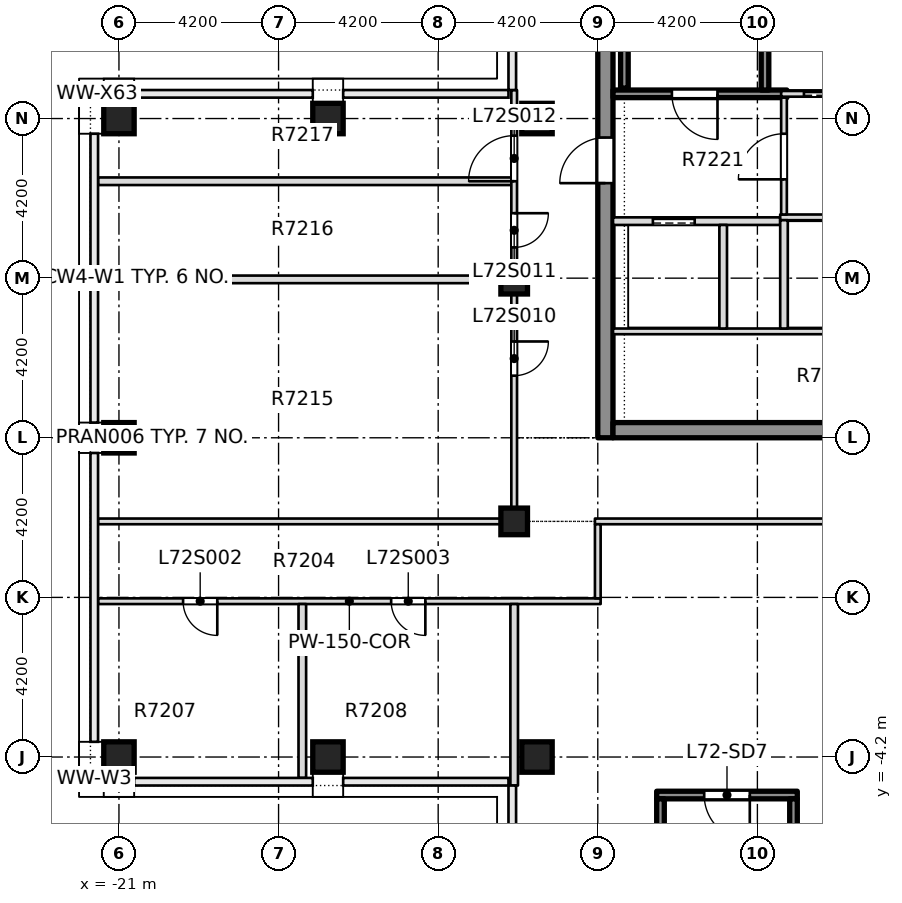
"""IFC4 building model, lengths in metres.
Left out: names, types, materials, properties, quantities, classifications, styles, units other than length and angle.
Written with IfcOpenShell. Run it as: python <this file> out.ifc"""

import sys

from ifc_helpers import new_model, si_unit, direction, frame, frame_2d, origin, origin_2d, place, context, subcontext, project, spatial, rectangle, extrude, element, fill, save


model = new_model("IFC4")
c1 = context("Model", 3, precision=1e-05, world=origin(), true_north=direction((0.0, 1.0)))
c2 = subcontext(c1, "Body", "Model", "MODEL_VIEW")
j1 = project(units=[si_unit("LENGTHUNIT", "METRE"), si_unit("PLANEANGLEUNIT", "RADIAN")], contexts=[c1])
p1 = place(None, origin())
s1 = spatial("IfcSite", under=j1, at=p1, CompositionType="ELEMENT")
p2 = place(p1, origin())
s2 = spatial("IfcBuilding", under=s1, at=p2, CompositionType="ELEMENT")
p3 = place(p2, frame((0.0, 0.0, 273.85)))
s3 = spatial("IfcBuildingStorey", under=s2, at=p3, CompositionType="ELEMENT", Elevation=273.85)
p4 = place(p3, frame((-8.2, 4.2, -0.5), z_axis=(0.0, 0.0, 1.0), x_axis=(0.0, 1.0, 0.0)))
e1 = element("IfcWall", 1, at=p4, inside=s3, PredefinedType="SHEAR", context=c2, shape_type="SweptSolid", body=[
    extrude(rectangle(XDim=17.55, YDim=0.4, at=frame_2d((8.775, 0.0))), origin(), (0.0, 0.0, 1.0), 4.5),
])
p5 = place(p4, frame((6.7, 0.0, 0.5)))
e2 = element("IfcOpeningElement", 2, at=p5, cuts=e1, PredefinedType="OPENING", context=c2, shape_type="SweptSolid", body=[
    extrude(rectangle(XDim=1.2, YDim=2.1, at=frame_2d((0.6, 1.05))), frame((0.0, 0.21, 0.0), z_axis=(0.0, -1.0, 0.0), x_axis=(1.0, 0.0, 0.0)), (0.0, 0.0, 1.0), 0.42),
])
p6 = place(p3, frame((-8.0, 4.4, -0.5), z_axis=(0.0, 0.0, 1.0), x_axis=(1.0, 0.0, 0.0)))
e3 = element("IfcWall", 3, at=p6, inside=s3, PredefinedType="SHEAR", context=c2, shape_type="SweptSolid", body=[
    extrude(rectangle(XDim=16.0, YDim=0.4, at=frame_2d((8.0, 0.0))), origin(), (0.0, 0.0, 1.0), 4.5),
])
for number, where, z_axis, x_axis in (
    (4, (-21.0, -4.2, -0.5), (0.0, 0.0, 1.0), (1.0, 0.0, 0.0)),
    (5, (-15.5, -4.2, -0.5), (0.0, 0.0, 1.0), (1.0, 0.0, 0.0)),
    (6, (-10.0, -4.2, -0.5), (0.0, 0.0, 1.0), (1.0, 0.0, 0.0)),
    (7, (-21.0, 4.2, -0.5), (0.0, 0.0, 1.0), (1.0, 0.0, 0.0)),
    (8, (-21.0, 12.6, -0.5), (0.0, 0.0, 1.0), (1.0, 0.0, 0.0)),
    (9, (-15.5, 12.6, -0.5), (0.0, 0.0, 1.0), (1.0, 0.0, 0.0)),
    (10, (-10.0, 12.6, -0.5), (0.0, 0.0, 1.0), (1.0, 0.0, 0.0)),
):
    element("IfcColumn", number, at=place(p3, frame(where, z_axis=z_axis, x_axis=x_axis)), inside=s3, PredefinedType="COLUMN", context=c2, shape_type="SweptSolid", body=[
        extrude(rectangle(XDim=0.8, YDim=0.8, at=origin_2d()), origin(), (0.0, 0.0, 1.0), 4.5),
    ])
p7 = place(p3, frame((-10.6, 2.0, -0.5), z_axis=(0.0, 0.0, 1.0), x_axis=(1.0, 0.0, 0.0)))
e11 = element("IfcColumn", 11, at=p7, inside=s3, PredefinedType="COLUMN", context=c2, shape_type="SweptSolid", body=[
    extrude(rectangle(XDim=0.7, YDim=0.7, at=origin_2d()), origin(), (0.0, 0.0, 1.0), 4.5),
])
p8 = place(p3, frame((-10.6, 8.333, -0.5), z_axis=(0.0, 0.0, 1.0), x_axis=(1.0, 0.0, 0.0)))
e12 = element("IfcColumn", 12, at=p8, inside=s3, PredefinedType="COLUMN", context=c2, shape_type="SweptSolid", body=[
    extrude(rectangle(XDim=0.7, YDim=0.7, at=origin_2d()), origin(), (0.0, 0.0, 1.0), 5.0),
])
p9 = place(p3, frame((-21.55, -0.1, 0.0), z_axis=(0.0, 0.0, 1.0), x_axis=(1.0, 0.0, 0.0)))
e13 = element("IfcWall", 13, at=p9, inside=s3, PredefinedType="PARTITIONING", context=c2, shape_type="SweptSolid", body=[
    extrude(rectangle(XDim=13.225, YDim=0.15, at=frame_2d((6.613, 0.0))), origin(), (0.0, 0.0, 1.0), 4.0),
])
p10 = place(p9, frame((2.238, 0.0, 0.0)))
e14 = element("IfcOpeningElement", 14, at=p10, cuts=e13, PredefinedType="OPENING", context=c2, shape_type="SweptSolid", body=[
    extrude(rectangle(XDim=0.9, YDim=2.1, at=frame_2d((0.45, 1.05))), frame((0.0, 0.085, 0.0), z_axis=(0.0, -1.0, 0.0), x_axis=(1.0, 0.0, 0.0)), (0.0, 0.0, 1.0), 0.17),
])
p11 = place(p9, frame((7.713, 0.0, 0.0)))
e15 = element("IfcOpeningElement", 15, at=p11, cuts=e13, PredefinedType="OPENING", context=c2, shape_type="SweptSolid", body=[
    extrude(rectangle(XDim=0.9, YDim=2.1, at=frame_2d((0.45, 1.05))), frame((0.0, 0.085, 0.0), z_axis=(0.0, -1.0, 0.0), x_axis=(1.0, 0.0, 0.0)), (0.0, 0.0, 1.0), 0.17),
])
p12 = place(p3, frame((-21.55, 2.0, 0.0), z_axis=(0.0, 0.0, 1.0), x_axis=(1.0, 0.0, 0.0)))
e16 = element("IfcWall", 16, at=p12, inside=s3, PredefinedType="PARTITIONING", context=c2, shape_type="SweptSolid", body=[
    extrude(rectangle(XDim=11.025, YDim=0.15, at=frame_2d((5.513, 0.0))), origin(), (0.0, 0.0, 1.0), 4.0),
])
p13 = place(p3, frame((-8.475, 2.0, 0.0), z_axis=(0.0, 0.0, 1.0), x_axis=(1.0, 0.0, 0.0)))
e17 = element("IfcWall", 17, at=p13, inside=s3, PredefinedType="PARTITIONING", context=c2, shape_type="SweptSolid", body=[
    extrude(rectangle(XDim=16.95, YDim=0.15, at=frame_2d((8.475, 0.0))), origin(), (0.0, 0.0, 1.0), 4.0),
])
p14 = place(p13, frame((7.725, 0.0, 0.0)))
e18 = element("IfcOpeningElement", 18, at=p14, cuts=e17, PredefinedType="OPENING", context=c2, shape_type="SweptSolid", body=[
    extrude(rectangle(XDim=1.5, YDim=2.1, at=frame_2d((0.75, 1.05))), frame((0.0, 0.085, 0.0), z_axis=(0.0, -1.0, 0.0), x_axis=(1.0, 0.0, 0.0)), (0.0, 0.0, 1.0), 0.17),
])
for number, where, z_axis, x_axis in (
    (19, (-21.55, 8.368, 0.0), (0.0, 0.0, 1.0), (1.0, 0.0, 0.0)),
    (20, (-21.55, 10.95, 0.0), (0.0, 0.0, 1.0), (1.0, 0.0, 0.0)),
):
    element("IfcWall", number, at=place(p3, frame(where, z_axis=z_axis, x_axis=x_axis)), inside=s3, PredefinedType="PARTITIONING", context=c2, shape_type="SweptSolid", body=[
        extrude(rectangle(XDim=10.875, YDim=0.2, at=frame_2d((5.438, 0.0))), origin(), (0.0, 0.0, 1.0), 4.0),
    ])
p15 = place(p3, frame((-16.175, -4.75, 0.0), z_axis=(0.0, 0.0, 1.0), x_axis=(0.0, 1.0, 0.0)))
e21 = element("IfcWall", 21, at=p15, inside=s3, PredefinedType="PARTITIONING", context=c2, shape_type="SweptSolid", body=[
    extrude(rectangle(XDim=4.575, YDim=0.2, at=frame_2d((2.288, 0.0))), origin(), (0.0, 0.0, 1.0), 4.0),
])
p16 = place(p3, frame((-10.6, -4.95, 0.0), z_axis=(0.0, 0.0, 1.0), x_axis=(0.0, 1.0, 0.0)))
e22 = element("IfcWall", 22, at=p16, inside=s3, PredefinedType="PARTITIONING", context=c2, shape_type="SweptSolid", body=[
    extrude(rectangle(XDim=4.775, YDim=0.2, at=frame_2d((2.387, 0.0))), origin(), (0.0, 0.0, 1.0), 4.0),
])
p17 = place(p3, frame((-10.6, 2.075, 0.0), z_axis=(0.0, 0.0, 1.0), x_axis=(0.0, 1.0, 0.0)))
e23 = element("IfcWall", 23, at=p17, inside=s3, PredefinedType="PARTITIONING", context=c2, shape_type="SweptSolid", body=[
    extrude(rectangle(XDim=11.275, YDim=0.15, at=frame_2d((5.638, 0.0))), origin(), (0.0, 0.0, 1.0), 4.0),
])
p18 = place(p17, frame((3.759, 0.0, 0.0)))
e24 = element("IfcOpeningElement", 24, at=p18, cuts=e23, PredefinedType="OPENING", context=c2, shape_type="SweptSolid", body=[
    extrude(rectangle(XDim=0.9, YDim=2.1, at=frame_2d((0.45, 1.05))), frame((0.0, 0.085, 0.0), z_axis=(0.0, -1.0, 0.0), x_axis=(1.0, 0.0, 0.0)), (0.0, 0.0, 1.0), 0.17),
])
p19 = place(p17, frame((7.134, 0.0, 0.0)))
e25 = element("IfcOpeningElement", 25, at=p19, cuts=e23, PredefinedType="OPENING", context=c2, shape_type="SweptSolid", body=[
    extrude(rectangle(XDim=0.9, YDim=2.1, at=frame_2d((0.45, 1.05))), frame((0.0, 0.085, 0.0), z_axis=(0.0, -1.0, 0.0), x_axis=(1.0, 0.0, 0.0)), (0.0, 0.0, 1.0), 0.17),
])
p20 = place(p17, frame((8.875, 0.0, 0.0)))
e26 = element("IfcOpeningElement", 26, at=p20, cuts=e23, PredefinedType="OPENING", context=c2, shape_type="SweptSolid", body=[
    extrude(rectangle(XDim=1.2, YDim=2.1, at=frame_2d((0.6, 1.05))), frame((0.0, 0.085, 0.0), z_axis=(0.0, -1.0, 0.0), x_axis=(1.0, 0.0, 0.0)), (0.0, 0.0, 1.0), 0.17),
])
p21 = place(p3, frame((-8.4, -0.025, 0.0), z_axis=(0.0, 0.0, 1.0), x_axis=(0.0, 1.0, 0.0)))
e27 = element("IfcWall", 27, at=p21, inside=s3, PredefinedType="PARTITIONING", context=c2, shape_type="SweptSolid", body=[
    extrude(rectangle(XDim=1.95, YDim=0.15, at=frame_2d((0.975, 0.0))), origin(), (0.0, 0.0, 1.0), 4.0),
])
p22 = place(p3, frame((-21.4, 13.25, 0.0), z_axis=(0.0, 0.0, 1.0), x_axis=(-1.0, 0.0, 0.0)))
e28 = element("IfcWall", 28, at=p22, inside=s3, PredefinedType="STANDARD", context=c2, shape_type="SweptSolid", body=[
    extrude(rectangle(XDim=0.35, YDim=0.2, at=frame_2d((0.175, 0.0))), origin(), (0.0, 0.0, 1.0), 4.0),
])
p23 = place(p3, frame((-21.65, -4.6, 0.0), z_axis=(0.0, 0.0, 1.0), x_axis=(0.0, -1.0, 0.0)))
e29 = element("IfcWall", 29, at=p23, inside=s3, PredefinedType="STANDARD", context=c2, shape_type="SweptSolid", body=[
    extrude(rectangle(XDim=0.35, YDim=0.2, at=frame_2d((0.175, 0.0))), origin(), (0.0, 0.0, 1.0), 4.0),
])
p24 = place(p3, frame((-7.999, 7.0, 0.0), z_axis=(0.0, 0.0, 1.0), x_axis=(1.0, 0.0, 0.0)))
e30 = element("IfcWall", 30, at=p24, inside=s3, PredefinedType="PARTITIONING", context=c2, shape_type="SweptSolid", body=[
    extrude(rectangle(XDim=15.998, YDim=0.15, at=frame_2d((7.999, 0.0))), origin(), (0.0, 0.0, 1.0), 4.0),
])
p25 = place(p24, frame((7.299, 0.0, 0.0)))
e31 = element("IfcOpeningElement", 31, at=p25, cuts=e30, PredefinedType="OPENING", context=c2, shape_type="SweptSolid", body=[
    extrude(rectangle(XDim=1.4, YDim=2.1, at=frame_2d((0.7, 1.05))), frame((0.0, 0.085, 0.0), z_axis=(0.0, -1.0, 0.0), x_axis=(1.0, 0.0, 0.0)), (0.0, 0.0, 1.0), 0.17),
])
p26 = place(p3, frame((-7.999, 9.9, 0.0), z_axis=(0.0, 0.0, 1.0), x_axis=(1.0, 0.0, 0.0)))
e32 = element("IfcWall", 32, at=p26, inside=s3, PredefinedType="PARTITIONING", context=c2, shape_type="SweptSolid", body=[
    extrude(rectangle(XDim=4.399, YDim=0.2, at=frame_2d((2.199, 0.0))), origin(), (0.0, 0.0, 1.0), 4.0),
])
p27 = place(p26, frame((1.049, 0.0, 0.0)))
e33 = element("IfcOpeningElement", 33, at=p27, cuts=e32, PredefinedType="OPENING", context=c2, shape_type="SweptSolid", body=[
    extrude(rectangle(XDim=1.1, YDim=2.1, at=frame_2d((0.55, 1.05))), frame((0.0, 0.11, 0.0), z_axis=(0.0, -1.0, 0.0), x_axis=(1.0, 0.0, 0.0)), (0.0, 0.0, 1.0), 0.22),
])
p28 = place(p3, frame((-3.6, 10.0, 0.0), z_axis=(0.0, 0.0, 1.0), x_axis=(1.0, 0.0, 0.0)))
e34 = element("IfcWall", 34, at=p28, inside=s3, PredefinedType="PARTITIONING", context=c2, shape_type="SweptSolid", body=[
    extrude(rectangle(XDim=7.2, YDim=0.15, at=frame_2d((3.6, 0.0))), origin(), (0.0, 0.0, 1.0), 4.0),
])
p29 = place(p28, frame((2.9, 0.0, 0.0)))
e35 = element("IfcOpeningElement", 35, at=p29, cuts=e34, PredefinedType="OPENING", context=c2, shape_type="SweptSolid", body=[
    extrude(rectangle(XDim=1.4, YDim=2.1, at=frame_2d((0.7, 1.05))), frame((0.0, 0.085, 0.0), z_axis=(0.0, -1.0, 0.0), x_axis=(1.0, 0.0, 0.0)), (0.0, 0.0, 1.0), 0.17),
])
p30 = place(p3, frame((-7.999, 13.25, 0.0), z_axis=(0.0, 0.0, 1.0), x_axis=(1.0, 0.0, 0.0)))
e36 = element("IfcWall", 36, at=p30, inside=s3, PredefinedType="SOLIDWALL", context=c2, shape_type="SweptSolid", body=[
    extrude(rectangle(XDim=4.574, YDim=0.2, at=frame_2d((2.287, 0.0))), origin(), (0.0, 0.0, 1.0), 4.0),
])
p31 = place(p30, frame((1.549, 0.0, 0.0)))
e37 = element("IfcOpeningElement", 37, at=p31, cuts=e36, PredefinedType="OPENING", context=c2, shape_type="SweptSolid", body=[
    extrude(rectangle(XDim=1.2, YDim=2.1, at=frame_2d((0.6, 1.05))), frame((0.0, 0.11, 0.0), z_axis=(0.0, -1.0, 0.0), x_axis=(1.0, 0.0, 0.0)), (0.0, 0.0, 1.0), 0.22),
])
p32 = place(p3, frame((-3.575, 13.25, 0.0), z_axis=(0.0, 0.0, 1.0), x_axis=(1.0, 0.0, 0.0)))
e38 = element("IfcWall", 38, at=p32, inside=s3, PredefinedType="PARTITIONING", context=c2, shape_type="SweptSolid", body=[
    extrude(rectangle(XDim=7.15, YDim=0.15, at=frame_2d((3.575, 0.0))), origin(), (0.0, 0.0, 1.0), 4.0),
])
p33 = place(p32, frame((0.6, 0.0, 0.0)))
e39 = element("IfcOpeningElement", 39, at=p33, cuts=e38, PredefinedType="OPENING", context=c2, shape_type="SweptSolid", body=[
    extrude(rectangle(XDim=1.2, YDim=2.1, at=frame_2d((0.6, 1.05))), frame((0.0, 0.085, 0.0), z_axis=(0.0, -1.0, 0.0), x_axis=(1.0, 0.0, 0.0)), (0.0, 0.0, 1.0), 0.17),
])
p34 = place(p32, frame((5.4, 0.0, 0.0)))
e40 = element("IfcOpeningElement", 40, at=p34, cuts=e38, PredefinedType="OPENING", context=c2, shape_type="SweptSolid", body=[
    extrude(rectangle(XDim=1.1, YDim=2.1, at=frame_2d((0.55, 1.05))), frame((0.0, 0.085, 0.0), z_axis=(0.0, -1.0, 0.0), x_axis=(1.0, 0.0, 0.0)), (0.0, 0.0, 1.0), 0.17),
])
p35 = place(p32, frame((2.975, 0.0, 0.0)))
e41 = element("IfcOpeningElement", 41, at=p35, cuts=e38, PredefinedType="OPENING", context=c2, shape_type="SweptSolid", body=[
    extrude(rectangle(XDim=1.2, YDim=2.1, at=frame_2d((0.6, 1.05))), frame((0.0, 0.085, 0.0), z_axis=(0.0, -1.0, 0.0), x_axis=(1.0, 0.0, 0.0)), (0.0, 0.0, 1.0), 0.17),
])
p36 = place(p3, frame((-5.1, 7.075, 0.0), z_axis=(0.0, 0.0, 1.0), x_axis=(0.0, 1.0, 0.0)))
e42 = element("IfcWall", 42, at=p36, inside=s3, PredefinedType="PARTITIONING", context=c2, shape_type="SweptSolid", body=[
    extrude(rectangle(XDim=2.725, YDim=0.2, at=frame_2d((1.363, 0.0))), origin(), (0.0, 0.0, 1.0), 4.0),
])
p37 = place(p3, frame((-4.0, 13.35, 0.0), z_axis=(0.0, 0.0, 1.0), x_axis=(0.0, 1.0, 0.0)))
e43 = element("IfcWall", 43, at=p37, inside=s3, PredefinedType="SOLIDWALL", context=c2, shape_type="SweptSolid", body=[
    extrude(rectangle(XDim=7.999, YDim=0.2, at=frame_2d((4.0, 0.0))), origin(), (0.0, 0.0, 1.0), 4.0),
])
p38 = place(p3, frame((-3.5, 7.075, 0.0), z_axis=(0.0, 0.0, 1.0), x_axis=(0.0, 1.0, 0.0)))
e44 = element("IfcWall", 44, at=p38, inside=s3, PredefinedType="PARTITIONING", context=c2, shape_type="SweptSolid", body=[
    extrude(rectangle(XDim=2.85, YDim=0.2, at=frame_2d((1.425, 0.0))), origin(), (0.0, 0.0, 1.0), 4.0),
])
p39 = place(p3, frame((-3.5, 10.075, 0.0), z_axis=(0.0, 0.0, 1.0), x_axis=(0.0, 1.0, 0.0)))
e45 = element("IfcWall", 45, at=p39, inside=s3, PredefinedType="PARTITIONING", context=c2, shape_type="SweptSolid", body=[
    extrude(rectangle(XDim=3.075, YDim=0.15, at=frame_2d((1.538, 0.0))), origin(), (0.0, 0.0, 1.0), 4.0),
])
p40 = place(p39, frame((0.925, 0.0, 0.0)))
e46 = element("IfcOpeningElement", 46, at=p40, cuts=e45, PredefinedType="OPENING", context=c2, shape_type="SweptSolid", body=[
    extrude(rectangle(XDim=1.2, YDim=2.1, at=frame_2d((0.6, 1.05))), frame((0.0, 0.085, 0.0), z_axis=(0.0, -1.0, 0.0), x_axis=(1.0, 0.0, 0.0)), (0.0, 0.0, 1.0), 0.17),
])
p41 = place(p3, frame((-6.85, -5.2, 0.0), z_axis=(0.0, 0.0, 1.0), x_axis=(1.0, 0.0, 0.0)))
e47 = element("IfcWall", 47, at=p41, inside=s3, PredefinedType="SOLIDWALL", context=c2, shape_type="SweptSolid", body=[
    extrude(rectangle(XDim=3.7, YDim=0.2, at=frame_2d((1.85, 0.0))), origin(), (0.0, 0.0, 1.0), 4.0),
])
p42 = place(p41, frame((1.25, 0.0, 0.0)))
e48 = element("IfcOpeningElement", 48, at=p42, cuts=e47, PredefinedType="OPENING", context=c2, shape_type="SweptSolid", body=[
    extrude(rectangle(XDim=1.2, YDim=2.1, at=frame_2d((0.6, 1.05))), frame((0.0, 0.11, 0.0), z_axis=(0.0, -1.0, 0.0), x_axis=(1.0, 0.0, 0.0)), (0.0, 0.0, 1.0), 0.22),
])
p43 = place(p3, frame((-6.75, -11.9, 0.0), z_axis=(0.0, 0.0, 1.0), x_axis=(0.0, 1.0, 0.0)))
e49 = element("IfcWall", 49, at=p43, inside=s3, PredefinedType="SOLIDWALL", context=c2, shape_type="SweptSolid", body=[
    extrude(rectangle(XDim=6.6, YDim=0.2, at=frame_2d((3.3, 0.0))), origin(), (0.0, 0.0, 1.0), 4.0),
])
p44 = place(p3, frame((-3.25, -12.2, 0.0), z_axis=(0.0, 0.0, 1.0), x_axis=(0.0, 1.0, 0.0)))
e50 = element("IfcWall", 50, at=p44, inside=s3, PredefinedType="SOLIDWALL", context=c2, shape_type="SweptSolid", body=[
    extrude(rectangle(XDim=6.9, YDim=0.2, at=frame_2d((3.45, 0.0))), origin(), (0.0, 0.0, 1.0), 4.0),
])
p45 = place(p3, frame((-7.7, 13.4, 0.0), z_axis=(0.0, 0.0, 1.0), x_axis=(0.0, 1.0, 0.0)))
e51 = element("IfcWall", 51, at=p45, inside=s3, PredefinedType="SOLIDWALL", context=c2, shape_type="SweptSolid", body=[
    extrude(rectangle(XDim=7.45, YDim=0.2, at=frame_2d((3.725, 0.0))), origin(), (0.0, 0.0, 1.0), 4.0),
])
p46 = place(p10, origin())
e52 = element("IfcDoor", 52, at=p46, inside=s3, OperationType="SINGLE_SWING_LEFT", PredefinedType="DOOR", context=c2, shape_type="SweptSolid", body=[
    extrude(rectangle(XDim=0.9, YDim=2.1, at=frame_2d((0.45, 1.05))), frame((0.0, 0.025, 0.0), z_axis=(0.0, -1.0, 0.0), x_axis=(1.0, 0.0, 0.0)), (0.0, 0.0, 1.0), 0.05),
])
fill(e14, e52)
p47 = place(p11, origin())
e53 = element("IfcDoor", 53, at=p47, inside=s3, OperationType="SINGLE_SWING_LEFT", PredefinedType="DOOR", context=c2, shape_type="SweptSolid", body=[
    extrude(rectangle(XDim=0.9, YDim=2.1, at=frame_2d((0.45, 1.05))), frame((0.0, 0.025, 0.0), z_axis=(0.0, -1.0, 0.0), x_axis=(1.0, 0.0, 0.0)), (0.0, 0.0, 1.0), 0.05),
])
fill(e15, e53)
p48 = place(p18, origin())
e54 = element("IfcDoor", 54, at=p48, inside=s3, OperationType="SINGLE_SWING_LEFT", PredefinedType="DOOR", context=c2, shape_type="SweptSolid", body=[
    extrude(rectangle(XDim=0.9, YDim=2.1, at=frame_2d((0.45, 1.05))), frame((0.0, 0.025, 0.0), z_axis=(0.0, -1.0, 0.0), x_axis=(1.0, 0.0, 0.0)), (0.0, 0.0, 1.0), 0.05),
])
fill(e24, e54)
p49 = place(p19, origin())
e55 = element("IfcDoor", 55, at=p49, inside=s3, OperationType="SINGLE_SWING_LEFT", PredefinedType="DOOR", context=c2, shape_type="SweptSolid", body=[
    extrude(rectangle(XDim=0.9, YDim=2.1, at=frame_2d((0.45, 1.05))), frame((0.0, 0.025, 0.0), z_axis=(0.0, -1.0, 0.0), x_axis=(1.0, 0.0, 0.0)), (0.0, 0.0, 1.0), 0.05),
])
fill(e25, e55)
p50 = place(p20, origin())
e56 = element("IfcDoor", 56, at=p50, inside=s3, OperationType="SINGLE_SWING_RIGHT", PredefinedType="DOOR", context=c2, shape_type="SweptSolid", body=[
    extrude(rectangle(XDim=1.2, YDim=2.1, at=frame_2d((0.6, 1.05))), frame((0.0, 0.025, 0.0), z_axis=(0.0, -1.0, 0.0), x_axis=(1.0, 0.0, 0.0)), (0.0, 0.0, 1.0), 0.05),
])
fill(e26, e56)
p51 = place(p31, origin())
e57 = element("IfcDoor", 57, at=p51, inside=s3, OperationType="SINGLE_SWING_LEFT", PredefinedType="DOOR", context=c2, shape_type="SweptSolid", body=[
    extrude(rectangle(XDim=1.2, YDim=2.1, at=frame_2d((0.6, 1.05))), frame((0.0, 0.025, 0.0), z_axis=(0.0, -1.0, 0.0), x_axis=(1.0, 0.0, 0.0)), (0.0, 0.0, 1.0), 0.05),
])
fill(e37, e57)
p52 = place(p27, origin())
e58 = element("IfcDoor", 58, at=p52, inside=s3, OperationType="SLIDING_TO_LEFT", PredefinedType="DOOR", context=c2, shape_type="SweptSolid", body=[
    extrude(rectangle(XDim=1.1, YDim=2.1, at=frame_2d((0.55, 1.05))), frame((0.0, 0.025, 0.0), z_axis=(0.0, -1.0, 0.0), x_axis=(1.0, 0.0, 0.0)), (0.0, 0.0, 1.0), 0.05),
])
fill(e33, e58)
p53 = place(p33, origin())
e59 = element("IfcDoor", 59, at=p53, inside=s3, OperationType="SLIDING_TO_RIGHT", PredefinedType="DOOR", context=c2, shape_type="SweptSolid", body=[
    extrude(rectangle(XDim=1.2, YDim=2.1, at=frame_2d((0.6, 1.05))), frame((0.0, 0.025, 0.0), z_axis=(0.0, -1.0, 0.0), x_axis=(1.0, 0.0, 0.0)), (0.0, 0.0, 1.0), 0.05),
])
fill(e39, e59)
p54 = place(p40, origin())
e60 = element("IfcDoor", 60, at=p54, inside=s3, OperationType="SINGLE_SWING_RIGHT", PredefinedType="DOOR", context=c2, shape_type="SweptSolid", body=[
    extrude(rectangle(XDim=1.2, YDim=2.1, at=frame_2d((0.6, 1.05))), frame((0.0, 0.025, 0.0), z_axis=(0.0, -1.0, 0.0), x_axis=(1.0, 0.0, 0.0)), (0.0, 0.0, 1.0), 0.05),
])
fill(e46, e60)
p55 = place(p5, origin())
e61 = element("IfcDoor", 61, at=p55, inside=s3, OperationType="SINGLE_SWING_LEFT", PredefinedType="DOOR", context=c2, shape_type="SweptSolid", body=[
    extrude(rectangle(XDim=1.2, YDim=2.1, at=frame_2d((0.6, 1.05))), frame((0.0, 0.025, 0.0), z_axis=(0.0, -1.0, 0.0), x_axis=(1.0, 0.0, 0.0)), (0.0, 0.0, 1.0), 0.05),
])
fill(e2, e61)
p56 = place(p42, origin())
e62 = element("IfcDoor", 62, at=p56, inside=s3, OperationType="SINGLE_SWING_LEFT", PredefinedType="DOOR", context=c2, shape_type="SweptSolid", body=[
    extrude(rectangle(XDim=1.2, YDim=2.1, at=frame_2d((0.6, 1.05))), frame((0.0, 0.025, 0.0), z_axis=(0.0, -1.0, 0.0), x_axis=(1.0, 0.0, 0.0)), (0.0, 0.0, 1.0), 0.05),
])
fill(e48, e62)
save(model, sys.argv[1])
